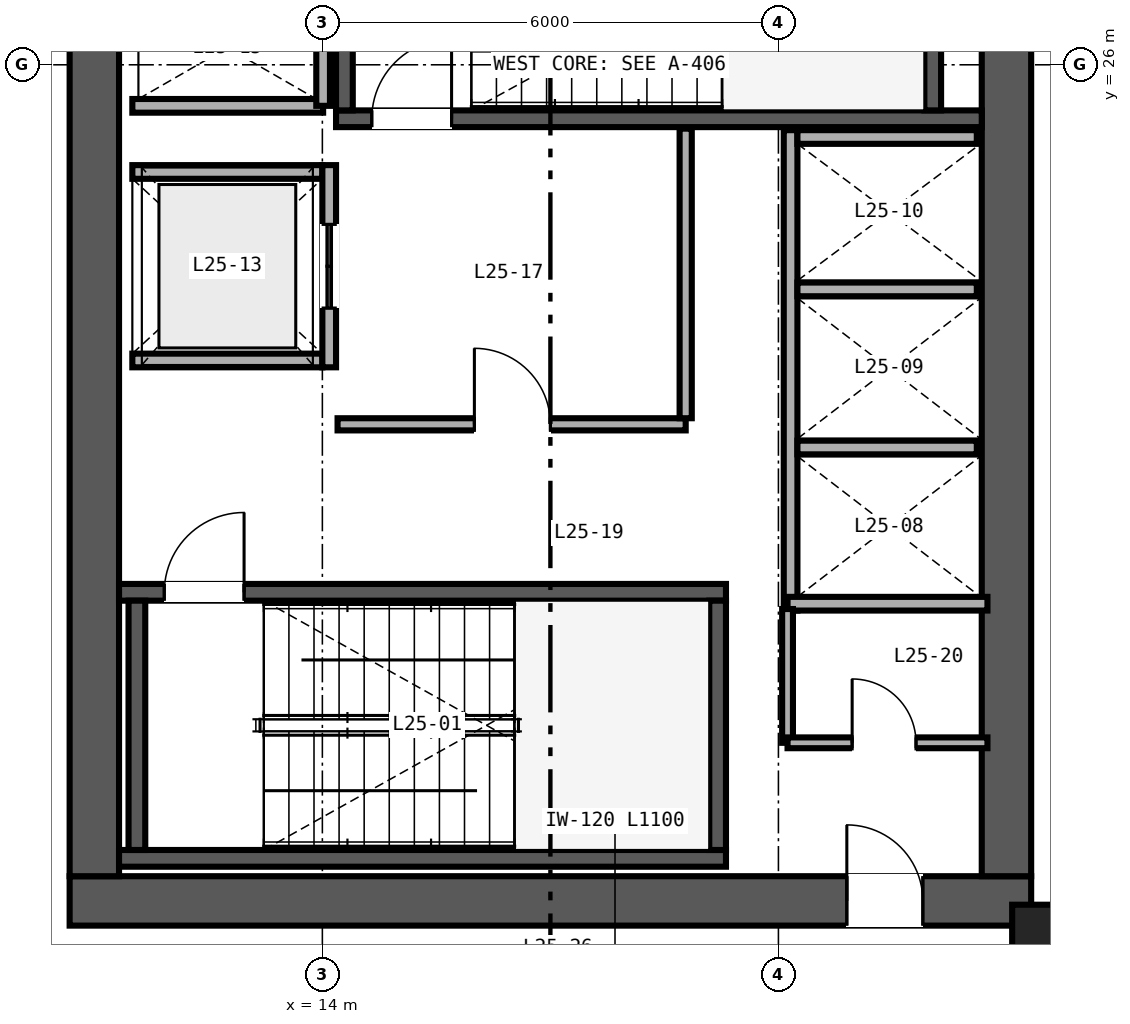
"""IFC4 building model, lengths in metres.
Left out: names, types, materials, properties, quantities, classifications, styles, units other than length and angle.
Written with IfcOpenShell. Run it as: python <this file> out.ifc"""

import sys

from ifc_helpers import new_model, si_unit, direction, frame, frame_2d, origin, origin_2d, place, context, subcontext, project, spatial, rectangle, hollow_rectangle, extrude, source, transform, mapped, element, fill, save


model = new_model("IFC4")
c1 = context("Model", 3, precision=1e-05, world=origin(), true_north=direction((0.0, 1.0)))
c2 = subcontext(c1, "Body", "Model", "MODEL_VIEW")
j1 = project(units=[si_unit("LENGTHUNIT", "METRE"), si_unit("PLANEANGLEUNIT", "RADIAN")], contexts=[c1])
p1 = place(None, origin())
s1 = spatial("IfcSite", under=j1, at=p1, CompositionType="ELEMENT")
p2 = place(p1, origin())
s2 = spatial("IfcBuilding", under=s1, at=p2, CompositionType="ELEMENT")
p3 = place(p2, frame((0.0, 0.0, 104.4)))
s3 = spatial("IfcBuildingStorey", under=s2, at=p3, CompositionType="ELEMENT", Elevation=104.4)
p4 = place(p3, frame((10.675, 15.0, 0.0), z_axis=(0.0, 0.0, 1.0), x_axis=(1.0, 0.0, 0.0)))
e1 = element("IfcWall", 1, at=p4, inside=s3, PredefinedType="SHEAR", context=c2, shape_type="SweptSolid", body=[
    extrude(rectangle(XDim=12.65, YDim=0.65, at=frame_2d((6.325, 0.0))), origin(), (0.0, 0.0, 1.0), 3.36),
])
p5 = place(p4, frame((10.225, 0.0, 0.0)))
e2 = element("IfcOpeningElement", 2, at=p5, cuts=e1, PredefinedType="OPENING", context=c2, shape_type="SweptSolid", body=[
    extrude(rectangle(XDim=1.0, YDim=2.15, at=frame_2d((0.5, 1.075))), frame((0.0, 0.335, 0.0), z_axis=(0.0, -1.0, 0.0), x_axis=(1.0, 0.0, 0.0)), (0.0, 0.0, 1.0), 0.67),
])
for number, where, z_axis, x_axis in (
    (3, (11.0, 15.325, 0.0), (0.0, 0.0, 1.0), (0.0, 1.0, 0.0)),
    (4, (23.0, 15.325, 0.0), (0.0, 0.0, 1.0), (0.0, 1.0, 0.0)),
):
    element("IfcWall", number, at=place(p3, frame(where, z_axis=z_axis, x_axis=x_axis)), inside=s3, PredefinedType="SHEAR", context=c2, shape_type="SweptSolid", body=[
        extrude(rectangle(XDim=21.35, YDim=0.65, at=frame_2d((10.675, 0.0))), origin(), (0.0, 0.0, 1.0), 3.36),
    ])
p6 = place(p3, frame((11.325, 15.56, 0.0), z_axis=(0.0, 0.0, 1.0), x_axis=(1.0, 0.0, 0.0)))
e5 = element("IfcWall", 5, at=p6, inside=s3, PredefinedType="SHEAR", context=c2, shape_type="SweptSolid", body=[
    extrude(rectangle(XDim=7.985, YDim=0.22, at=frame_2d((3.993, 0.0))), origin(), (0.0, 0.0, 1.0), 3.4),
])
p7 = place(p3, frame((11.325, 19.06, 0.0), z_axis=(0.0, 0.0, 1.0), x_axis=(1.0, 0.0, 0.0)))
e6 = element("IfcWall", 6, at=p7, inside=s3, PredefinedType="SHEAR", context=c2, shape_type="SweptSolid", body=[
    extrude(rectangle(XDim=7.985, YDim=0.22, at=frame_2d((3.993, 0.0))), origin(), (0.0, 0.0, 1.0), 3.4),
])
p8 = place(p7, frame((0.595, 0.0, 0.0)))
e7 = element("IfcOpeningElement", 7, at=p8, cuts=e6, PredefinedType="OPENING", context=c2, shape_type="SweptSolid", body=[
    extrude(rectangle(XDim=1.05, YDim=2.15, at=frame_2d((0.525, 1.075))), frame((0.0, 0.12, 0.0), z_axis=(0.0, -1.0, 0.0), x_axis=(1.0, 0.0, 0.0)), (0.0, 0.0, 1.0), 0.24),
])
for number, where, z_axis, x_axis in (
    (8, (11.56, 15.67, 0.0), (0.0, 0.0, 1.0), (0.0, 1.0, 0.0)),
    (9, (19.2, 15.67, 0.0), (0.0, 0.0, 1.0), (0.0, 1.0, 0.0)),
):
    element("IfcWall", number, at=place(p3, frame(where, z_axis=z_axis, x_axis=x_axis)), inside=s3, PredefinedType="SHEAR", context=c2, shape_type="SweptSolid", body=[
        extrude(rectangle(XDim=3.28, YDim=0.22, at=frame_2d((1.64, 0.0))), origin(), (0.0, 0.0, 1.0), 3.4),
    ])
p9 = place(p3, frame((14.18, 25.29, 0.0), z_axis=(0.0, 0.0, 1.0), x_axis=(1.0, 0.0, 0.0)))
e10 = element("IfcWall", 10, at=p9, inside=s3, PredefinedType="SHEAR", context=c2, shape_type="SweptSolid", body=[
    extrude(rectangle(XDim=8.495, YDim=0.22, at=frame_2d((4.248, 0.0))), origin(), (0.0, 0.0, 1.0), 3.4),
])
p10 = place(p9, frame((0.47, 0.0, 0.0)))
e11 = element("IfcOpeningElement", 11, at=p10, cuts=e10, PredefinedType="OPENING", context=c2, shape_type="SweptSolid", body=[
    extrude(rectangle(XDim=1.05, YDim=2.15, at=frame_2d((0.525, 1.075))), frame((0.0, 0.12, 0.0), z_axis=(0.0, -1.0, 0.0), x_axis=(1.0, 0.0, 0.0)), (0.0, 0.0, 1.0), 0.24),
])
for number, where, z_axis, x_axis in (
    (12, (14.29, 25.4, 0.0), (0.0, 0.0, 1.0), (0.0, 1.0, 0.0)),
    (13, (22.03, 25.4, 0.0), (0.0, 0.0, 1.0), (0.0, 1.0, 0.0)),
):
    element("IfcWall", number, at=place(p3, frame(where, z_axis=z_axis, x_axis=x_axis)), inside=s3, PredefinedType="SHEAR", context=c2, shape_type="SweptSolid", body=[
        extrude(rectangle(XDim=3.28, YDim=0.22, at=frame_2d((1.64, 0.0))), origin(), (0.0, 0.0, 1.0), 3.4),
    ])
m1 = source(origin(), c2, "Body", "SweptSolid", [
    extrude(hollow_rectangle(XDim=0.85, YDim=0.8, WallThickness=0.032, at=origin_2d()), origin(), (0.0, 0.0, 1.0), 3.36),
])
p11 = place(p3, frame((23.5, 14.55, 0.0), z_axis=(0.0, 0.0, 1.0), x_axis=(1.0, 0.0, 0.0)))
e14 = element("IfcColumn", 14, at=p11, inside=s3, PredefinedType="COLUMN", context=c2, shape_type="MappedRepresentation", body=[
    mapped(m1, transform((0.0, 0.0, 0.0), scale=1.0)),
])
p12 = place(p3, frame((20.16, 18.82, 0.0), z_axis=(0.0, 0.0, 1.0), x_axis=(0.0, 1.0, 0.0)))
e15 = element("IfcWall", 15, at=p12, inside=s3, PredefinedType="SOLIDWALL", context=c2, shape_type="SweptSolid", body=[
    extrude(rectangle(XDim=6.32, YDim=0.18, at=frame_2d((3.16, 0.0))), origin(), (0.0, 0.0, 1.0), 2.36),
])
p13 = place(p3, frame((20.12, 18.91, 0.0), z_axis=(0.0, 0.0, 1.0), x_axis=(1.0, 0.0, 0.0)))
e16 = element("IfcWall", 16, at=p13, inside=s3, PredefinedType="SOLIDWALL", context=c2, shape_type="SweptSolid", body=[
    extrude(rectangle(XDim=2.63, YDim=0.18, at=frame_2d((1.315, 0.0))), origin(), (0.0, 0.0, 1.0), 3.36),
])
p14 = place(p3, frame((20.25, 25.05, 0.0), z_axis=(0.0, 0.0, 1.0), x_axis=(1.0, 0.0, 0.0)))
e17 = element("IfcWall", 17, at=p14, inside=s3, PredefinedType="SOLIDWALL", context=c2, shape_type="SweptSolid", body=[
    extrude(rectangle(XDim=2.36, YDim=0.18, at=frame_2d((1.18, 0.0))), origin(), (0.0, 0.0, 1.0), 3.36),
])
p15 = place(p3, frame((20.25, 20.965, 0.0), z_axis=(0.0, 0.0, 1.0), x_axis=(1.0, 0.0, 0.0)))
e18 = element("IfcWall", 18, at=p15, inside=s3, PredefinedType="SOLIDWALL", context=c2, shape_type="SweptSolid", body=[
    extrude(rectangle(XDim=2.36, YDim=0.18, at=frame_2d((1.18, 0.0))), origin(), (0.0, 0.0, 1.0), 2.36),
])
p16 = place(p3, frame((20.25, 23.045, 0.0), z_axis=(0.0, 0.0, 1.0), x_axis=(1.0, 0.0, 0.0)))
e19 = element("IfcWall", 19, at=p16, inside=s3, PredefinedType="SOLIDWALL", context=c2, shape_type="SweptSolid", body=[
    extrude(rectangle(XDim=2.36, YDim=0.18, at=frame_2d((1.18, 0.0))), origin(), (0.0, 0.0, 1.0), 3.36),
])
for number, where, z_axis, x_axis in (
    (20, (11.5, 22.11, 0.0), (0.0, 0.0, 1.0), (1.0, 0.0, 0.0)),
    (21, (11.5, 24.59, 0.0), (0.0, 0.0, 1.0), (1.0, 0.0, 0.0)),
):
    element("IfcWall", number, at=place(p3, frame(where, z_axis=z_axis, x_axis=x_axis)), inside=s3, PredefinedType="SOLIDWALL", context=c2, shape_type="SweptSolid", body=[
        extrude(rectangle(XDim=2.5, YDim=0.18, at=frame_2d((1.25, 0.0))), origin(), (0.0, 0.0, 1.0), 3.36),
    ])
p17 = place(p3, frame((14.09, 22.02, 0.0), z_axis=(0.0, 0.0, 1.0), x_axis=(0.0, 1.0, 0.0)))
e22 = element("IfcWall", 22, at=p17, inside=s3, PredefinedType="SOLIDWALL", context=c2, shape_type="SweptSolid", body=[
    extrude(rectangle(XDim=2.66, YDim=0.18, at=frame_2d((1.33, 0.0))), origin(), (0.0, 0.0, 1.0), 3.36),
])
p18 = place(p17, frame((0.78, 0.0, 0.0)))
e23 = element("IfcOpeningElement", 23, at=p18, cuts=e22, PredefinedType="OPENING", context=c2, shape_type="SweptSolid", body=[
    extrude(rectangle(XDim=1.1, YDim=2.2, at=frame_2d((0.55, 1.1))), frame((0.0, 0.1, 0.0), z_axis=(0.0, -1.0, 0.0), x_axis=(1.0, 0.0, 0.0)), (0.0, 0.0, 1.0), 0.2),
])
p19 = place(p3, frame((11.5, 25.46, 0.0), z_axis=(0.0, 0.0, 1.0), x_axis=(1.0, 0.0, 0.0)))
e24 = element("IfcWall", 24, at=p19, inside=s3, PredefinedType="SOLIDWALL", context=c2, shape_type="SweptSolid", body=[
    extrude(rectangle(XDim=2.51, YDim=0.18, at=frame_2d((1.255, 0.0))), origin(), (0.0, 0.0, 1.0), 3.36),
])
p20 = place(p3, frame((14.01, 25.46, 0.0), z_axis=(0.0, 0.0, 1.0), x_axis=(0.0, 1.0, 0.0)))
e25 = element("IfcWall", 25, at=p20, inside=s3, PredefinedType="SOLIDWALL", context=c2, shape_type="SweptSolid", body=[
    extrude(rectangle(XDim=3.08, YDim=0.18, at=frame_2d((1.54, 0.0))), origin(), (0.0, 0.0, 1.0), 3.36),
])
p21 = place(p3, frame((14.2, 21.27, 0.0), z_axis=(0.0, 0.0, 1.0), x_axis=(1.0, 0.0, 0.0)))
e26 = element("IfcWall", 26, at=p21, inside=s3, PredefinedType="PARTITIONING", context=c2, shape_type="SweptSolid", body=[
    extrude(rectangle(XDim=4.58, YDim=0.16, at=frame_2d((2.29, 0.0))), origin(), (0.0, 0.0, 1.0), 3.36),
])
p22 = place(p21, frame((1.8, 0.0, 0.0)))
e27 = element("IfcOpeningElement", 27, at=p22, cuts=e26, PredefinedType="OPENING", context=c2, shape_type="SweptSolid", body=[
    extrude(rectangle(XDim=1.0, YDim=2.15, at=frame_2d((0.5, 1.075))), frame((0.0, 0.09, 0.0), z_axis=(0.0, -1.0, 0.0), x_axis=(1.0, 0.0, 0.0)), (0.0, 0.0, 1.0), 0.18),
])
p23 = place(p3, frame((18.78, 21.35, 0.0), z_axis=(0.0, 0.0, 1.0), x_axis=(0.0, 1.0, 0.0)))
e28 = element("IfcWall", 28, at=p23, inside=s3, PredefinedType="PARTITIONING", context=c2, shape_type="SweptSolid", body=[
    extrude(rectangle(XDim=3.81, YDim=0.16, at=frame_2d((1.905, 0.0))), origin(), (0.0, 0.0, 1.0), 3.36),
])
p24 = place(p3, frame((20.12, 17.08, 0.0), z_axis=(0.0, 0.0, 1.0), x_axis=(0.0, 1.0, 0.0)))
e29 = element("IfcWall", 29, at=p24, inside=s3, PredefinedType="PARTITIONING", context=c2, shape_type="SweptSolid", body=[
    extrude(rectangle(XDim=1.76, YDim=0.142, at=frame_2d((0.88, 0.0))), origin(), (0.0, 0.0, 1.0), 3.36),
])
p25 = place(p3, frame((20.12, 17.08, 0.0), z_axis=(0.0, 0.0, 1.0), x_axis=(1.0, 0.0, 0.0)))
e30 = element("IfcWall", 30, at=p25, inside=s3, PredefinedType="PARTITIONING", context=c2, shape_type="SweptSolid", body=[
    extrude(rectangle(XDim=2.63, YDim=0.142, at=frame_2d((1.315, 0.0))), origin(), (0.0, 0.0, 1.0), 3.36),
])
p26 = place(p25, frame((0.85, 0.0, 0.0)))
e31 = element("IfcOpeningElement", 31, at=p26, cuts=e30, PredefinedType="OPENING", context=c2, shape_type="SweptSolid", body=[
    extrude(rectangle(XDim=0.84, YDim=2.1, at=frame_2d((0.42, 1.05))), frame((0.0, 0.081, 0.0), z_axis=(0.0, -1.0, 0.0), x_axis=(1.0, 0.0, 0.0)), (0.0, 0.0, 1.0), 0.162),
])
m2 = source(origin(), c2, "Body", "SweptSolid", [
    extrude(rectangle(XDim=1.05, YDim=2.15, at=frame_2d((0.525, 1.075))), frame((0.0, 0.025, 0.0), z_axis=(0.0, -1.0, 0.0), x_axis=(1.0, 0.0, 0.0)), (0.0, 0.0, 1.0), 0.05),
])
p27 = place(p8, origin())
e32 = element("IfcDoor", 32, at=p27, inside=s3, OperationType="SINGLE_SWING_RIGHT", PredefinedType="DOOR", context=c2, shape_type="MappedRepresentation", body=[
    mapped(m2, transform((0.0, 0.0, 0.0), scale=1.0)),
])
fill(e7, e32)
p28 = place(p10, origin())
e33 = element("IfcDoor", 33, at=p28, inside=s3, OperationType="SINGLE_SWING_RIGHT", PredefinedType="DOOR", context=c2, shape_type="MappedRepresentation", body=[
    mapped(m2, transform((0.0, 0.0, 0.0), scale=1.0)),
])
fill(e11, e33)
m3 = source(origin(), c2, "Body", "SweptSolid", [
    extrude(rectangle(XDim=1.1, YDim=2.2, at=frame_2d((0.55, 1.1))), frame((0.0, 0.025, 0.0), z_axis=(0.0, -1.0, 0.0), x_axis=(1.0, 0.0, 0.0)), (0.0, 0.0, 1.0), 0.05),
])
p29 = place(p18, origin())
e34 = element("IfcDoor", 34, at=p29, inside=s3, OperationType="DOUBLE_DOOR_SLIDING", PredefinedType="DOOR", context=c2, shape_type="MappedRepresentation", body=[
    mapped(m3, transform((0.0, 0.0, 0.0), scale=1.0)),
])
fill(e23, e34)
m4 = source(origin(), c2, "Body", "SweptSolid", [
    extrude(rectangle(XDim=1.0, YDim=2.15, at=frame_2d((0.5, 1.075))), frame((0.0, 0.025, 0.0), z_axis=(0.0, -1.0, 0.0), x_axis=(1.0, 0.0, 0.0)), (0.0, 0.0, 1.0), 0.05),
])
p30 = place(p22, origin())
e35 = element("IfcDoor", 35, at=p30, inside=s3, OperationType="SINGLE_SWING_LEFT", PredefinedType="DOOR", context=c2, shape_type="MappedRepresentation", body=[
    mapped(m4, transform((0.0, 0.0, 0.0), scale=1.0)),
])
fill(e27, e35)
m5 = source(origin(), c2, "Body", "SweptSolid", [
    extrude(rectangle(XDim=0.84, YDim=2.1, at=frame_2d((0.42, 1.05))), frame((0.0, 0.025, 0.0), z_axis=(0.0, -1.0, 0.0), x_axis=(1.0, 0.0, 0.0)), (0.0, 0.0, 1.0), 0.05),
])
p31 = place(p26, origin())
e36 = element("IfcDoor", 36, at=p31, inside=s3, OperationType="SINGLE_SWING_LEFT", PredefinedType="DOOR", context=c2, shape_type="MappedRepresentation", body=[
    mapped(m5, transform((0.0, 0.0, 0.0), scale=1.0)),
])
fill(e31, e36)
p32 = place(p5, origin())
e37 = element("IfcDoor", 37, at=p32, inside=s3, OperationType="SINGLE_SWING_LEFT", PredefinedType="DOOR", context=c2, shape_type="MappedRepresentation", body=[
    mapped(m4, transform((0.0, 0.0, 0.0), scale=1.0)),
])
fill(e2, e37)
save(model, sys.argv[1])
